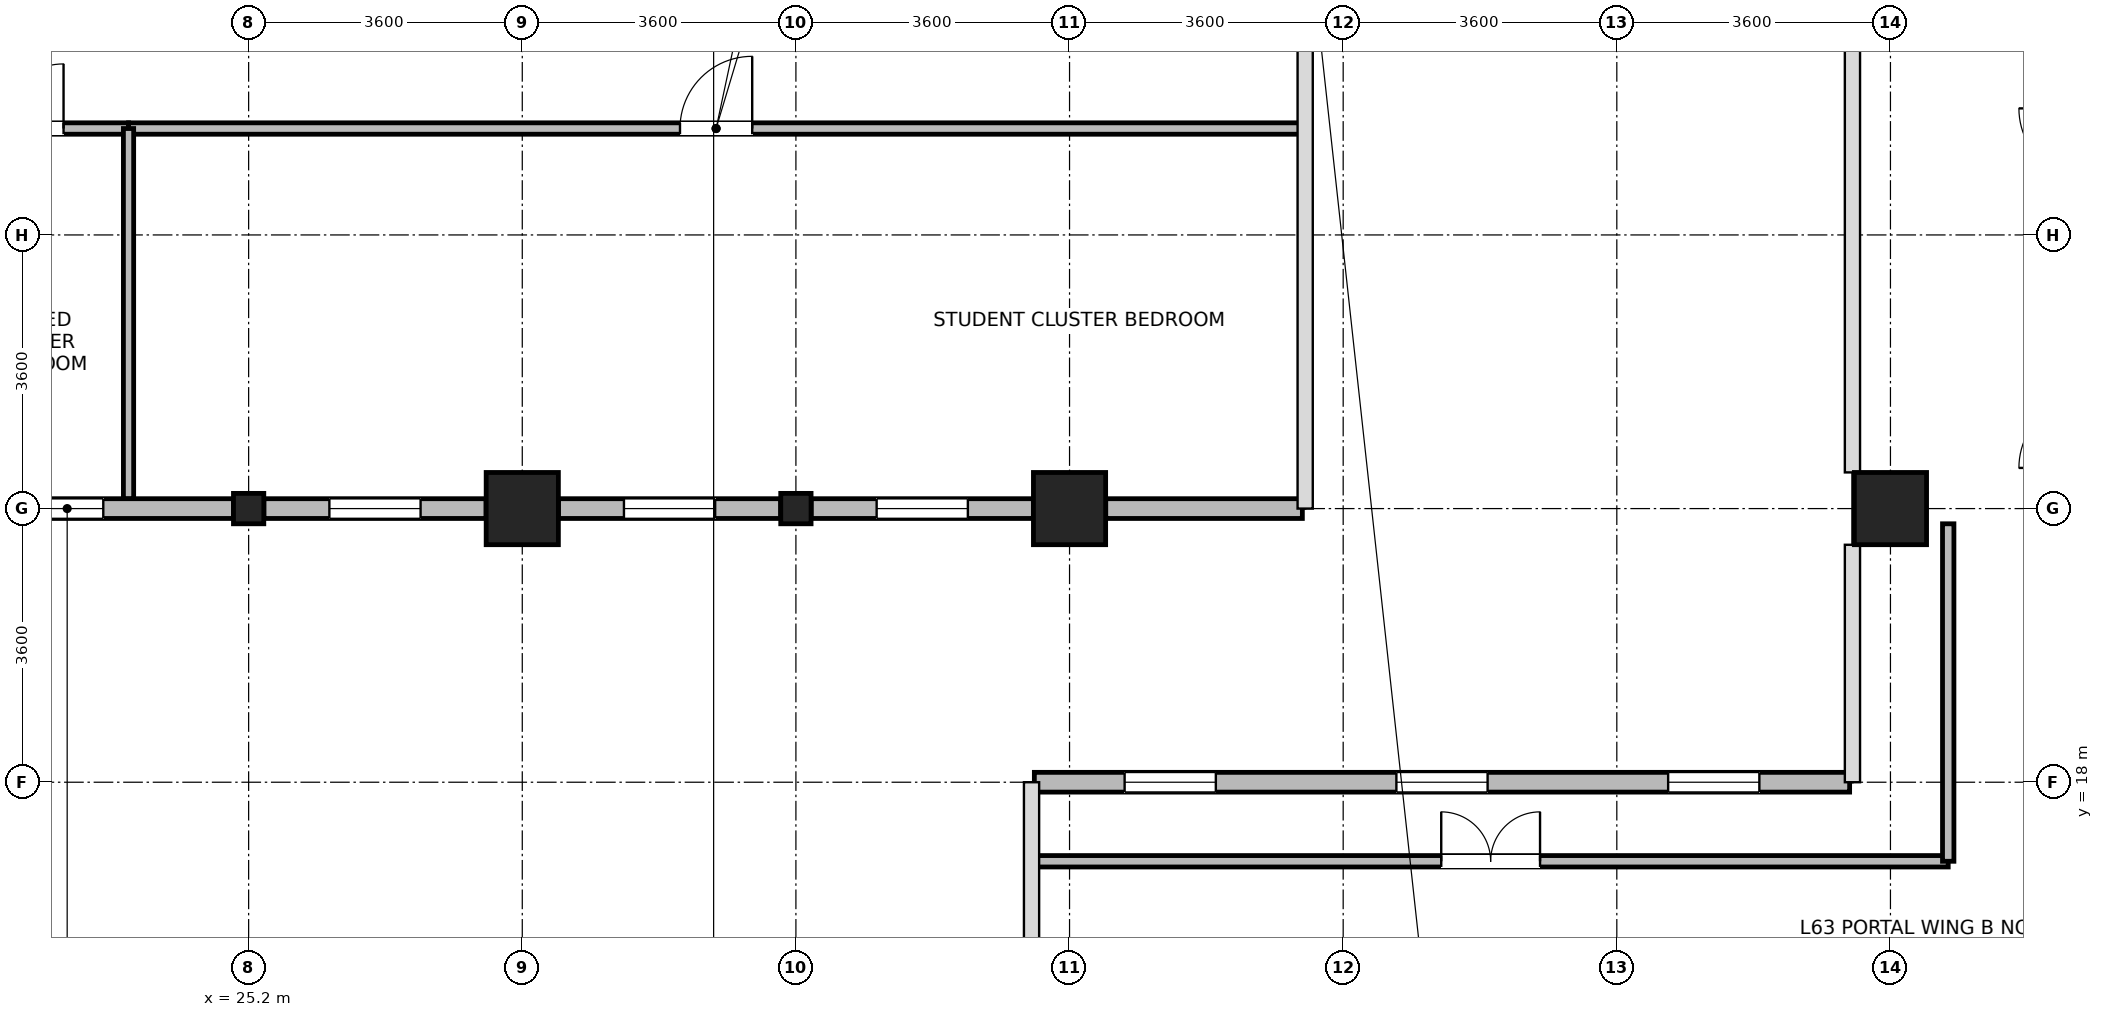
"""IFC4 building model, lengths in metres.
Left out: names, types, materials, properties, quantities, classifications, styles, units other than length and angle.
Written with IfcOpenShell. Run it as: python <this file> out.ifc"""

import sys

from ifc_helpers import new_model, si_unit, direction, frame, frame_2d, origin, origin_2d, place, context, subcontext, project, spatial, rectangle, i_section, extrude, source, transform, mapped, element, fill, save


model = new_model("IFC4")
c1 = context("Model", 3, precision=1e-05, world=origin(), true_north=direction((0.0, 1.0)))
c2 = subcontext(c1, "Body", "Model", "MODEL_VIEW")
j1 = project(units=[si_unit("LENGTHUNIT", "METRE"), si_unit("PLANEANGLEUNIT", "RADIAN")], contexts=[c1])
p1 = place(None, origin())
s1 = spatial("IfcSite", under=j1, at=p1, CompositionType="ELEMENT")
p2 = place(p1, origin())
s2 = spatial("IfcBuilding", under=s1, at=p2, CompositionType="ELEMENT")
p3 = place(p2, frame((0.0, 0.0, 246.2)))
s3 = spatial("IfcBuildingStorey", under=s2, at=p3, CompositionType="ELEMENT", Elevation=246.2)
m1 = source(origin(), c2, "Body", "SweptSolid", [
    extrude(rectangle(XDim=0.95, YDim=0.95, at=origin_2d()), origin(), (0.0, 0.0, 1.0), 3.7),
])
for number, where, z_axis, x_axis in (
    (1, (28.8, 21.6, 0.0), (0.0, 0.0, 1.0), (1.0, 0.0, 0.0)),
    (2, (36.0, 21.6, 0.0), (0.0, 0.0, 1.0), (1.0, 0.0, 0.0)),
    (3, (46.8, 21.6, 0.0), (0.0, 0.0, 1.0), (1.0, 0.0, 0.0)),
):
    element("IfcColumn", number, at=place(p3, frame(where, z_axis=z_axis, x_axis=x_axis)), inside=s3, PredefinedType="COLUMN", context=c2, shape_type="MappedRepresentation", body=[
        mapped(m1, transform((0.0, 0.0, 0.0), x_axis=(1.0, 0.0, 0.0), y_axis=(0.0, 1.0, 0.0), z_axis=(0.0, 0.0, 1.0), scale=1.0)),
    ])
m2 = source(origin(), c2, "Body", "SweptSolid", [
    extrude(i_section(OverallWidth=0.399, OverallDepth=0.4, WebThickness=0.017, FlangeThickness=0.023, FilletRadius=0.015, at=origin_2d()), origin(), (0.0, 0.0, 1.0), 3.7),
])
for number, where, z_axis, x_axis in (
    (4, (25.2, 21.6, 0.0), (0.0, 0.0, 1.0), (1.0, 0.0, 0.0)),
    (5, (32.4, 21.6, 0.0), (0.0, 0.0, 1.0), (1.0, 0.0, 0.0)),
):
    element("IfcColumn", number, at=place(p3, frame(where, z_axis=z_axis, x_axis=x_axis)), inside=s3, PredefinedType="COLUMN", context=c2, shape_type="MappedRepresentation", body=[
        mapped(m2, transform((0.0, 0.0, 0.0), x_axis=(1.0, 0.0, 0.0), y_axis=(0.0, 1.0, 0.0), z_axis=(0.0, 0.0, 1.0), scale=1.0)),
    ])
p4 = place(p3, frame((25.0, 21.6, 0.0), z_axis=(0.0, 0.0, 1.0), x_axis=(-1.0, 0.0, 0.0)))
e6 = element("IfcWall", 6, at=p4, inside=s3, PredefinedType="STANDARD", context=c2, shape_type="SweptSolid", body=[
    extrude(rectangle(XDim=2.924, YDim=0.26, at=frame_2d((1.462, 0.0))), origin(), (0.0, 0.0, 1.0), 2.86),
])
p5 = place(p4, frame((1.712, 0.0, 0.85)))
e7 = element("IfcOpeningElement", 7, at=p5, cuts=e6, PredefinedType="OPENING", context=c2, shape_type="SweptSolid", body=[
    extrude(rectangle(XDim=0.95, YDim=1.75, at=frame_2d((0.475, 0.875))), frame((0.0, 0.14, 0.0), z_axis=(0.0, -1.0, 0.0), x_axis=(1.0, 0.0, 0.0)), (0.0, 0.0, 1.0), 0.28),
])
p6 = place(p3, frame((28.324, 21.6, 0.0), z_axis=(0.0, 0.0, 1.0), x_axis=(-1.0, 0.0, 0.0)))
e8 = element("IfcWall", 8, at=p6, inside=s3, PredefinedType="STANDARD", context=c2, shape_type="SweptSolid", body=[
    extrude(rectangle(XDim=2.924, YDim=0.26, at=frame_2d((1.462, 0.0))), origin(), (0.0, 0.0, 1.0), 2.86),
])
p7 = place(p6, frame((0.862, 0.0, 0.85)))
e9 = element("IfcOpeningElement", 9, at=p7, cuts=e8, PredefinedType="OPENING", context=c2, shape_type="SweptSolid", body=[
    extrude(rectangle(XDim=1.2, YDim=1.75, at=frame_2d((0.6, 0.875))), frame((0.0, 0.14, 0.0), z_axis=(0.0, -1.0, 0.0), x_axis=(1.0, 0.0, 0.0)), (0.0, 0.0, 1.0), 0.28),
])
p8 = place(p3, frame((32.199, 21.6, 0.0), z_axis=(0.0, 0.0, 1.0), x_axis=(-1.0, 0.0, 0.0)))
e10 = element("IfcWall", 10, at=p8, inside=s3, PredefinedType="STANDARD", context=c2, shape_type="SweptSolid", body=[
    extrude(rectangle(XDim=2.924, YDim=0.26, at=frame_2d((1.462, 0.0))), origin(), (0.0, 0.0, 1.0), 2.86),
])
p9 = place(p8, frame((0.862, 0.0, 0.85)))
e11 = element("IfcOpeningElement", 11, at=p9, cuts=e10, PredefinedType="OPENING", context=c2, shape_type="SweptSolid", body=[
    extrude(rectangle(XDim=1.2, YDim=1.75, at=frame_2d((0.6, 0.875))), frame((0.0, 0.14, 0.0), z_axis=(0.0, -1.0, 0.0), x_axis=(1.0, 0.0, 0.0)), (0.0, 0.0, 1.0), 0.28),
])
p10 = place(p3, frame((35.524, 21.6, 0.0), z_axis=(0.0, 0.0, 1.0), x_axis=(-1.0, 0.0, 0.0)))
e12 = element("IfcWall", 12, at=p10, inside=s3, PredefinedType="STANDARD", context=c2, shape_type="SweptSolid", body=[
    extrude(rectangle(XDim=2.923, YDim=0.26, at=frame_2d((1.462, 0.0))), origin(), (0.0, 0.0, 1.0), 2.86),
])
p11 = place(p10, frame((0.862, 0.0, 0.85)))
e13 = element("IfcOpeningElement", 13, at=p11, cuts=e12, PredefinedType="OPENING", context=c2, shape_type="SweptSolid", body=[
    extrude(rectangle(XDim=1.2, YDim=1.75, at=frame_2d((0.6, 0.875))), frame((0.0, 0.14, 0.0), z_axis=(0.0, -1.0, 0.0), x_axis=(1.0, 0.0, 0.0)), (0.0, 0.0, 1.0), 0.28),
])
p12 = place(p3, frame((39.063, 21.6, 0.0), z_axis=(0.0, 0.0, 1.0), x_axis=(-1.0, 0.0, 0.0)))
e14 = element("IfcWall", 14, at=p12, inside=s3, PredefinedType="STANDARD", context=c2, shape_type="SweptSolid", body=[
    extrude(rectangle(XDim=2.587, YDim=0.26, at=frame_2d((1.293, 0.0))), origin(), (0.0, 0.0, 1.0), 1.46),
])
p13 = place(p3, frame((35.537, 18.0, 0.0), z_axis=(0.0, 0.0, 1.0), x_axis=(1.0, 0.0, 0.0)))
e15 = element("IfcWall", 15, at=p13, inside=s3, PredefinedType="STANDARD", context=c2, shape_type="SweptSolid", body=[
    extrude(rectangle(XDim=10.726, YDim=0.26, at=frame_2d((5.363, 0.0))), origin(), (0.0, 0.0, 1.0), 3.26),
])
p14 = place(p13, frame((1.188, 0.0, 0.85)))
e16 = element("IfcOpeningElement", 16, at=p14, cuts=e15, PredefinedType="OPENING", context=c2, shape_type="SweptSolid", body=[
    extrude(rectangle(XDim=1.2, YDim=1.75, at=frame_2d((0.6, 0.875))), frame((0.0, 0.14, 0.0), z_axis=(0.0, -1.0, 0.0), x_axis=(1.0, 0.0, 0.0)), (0.0, 0.0, 1.0), 0.28),
])
p15 = place(p13, frame((4.763, 0.0, 0.85)))
e17 = element("IfcOpeningElement", 17, at=p15, cuts=e15, PredefinedType="OPENING", context=c2, shape_type="SweptSolid", body=[
    extrude(rectangle(XDim=1.2, YDim=1.75, at=frame_2d((0.6, 0.875))), frame((0.0, 0.14, 0.0), z_axis=(0.0, -1.0, 0.0), x_axis=(1.0, 0.0, 0.0)), (0.0, 0.0, 1.0), 0.28),
])
p16 = place(p13, frame((8.338, 0.0, 0.85)))
e18 = element("IfcOpeningElement", 18, at=p16, cuts=e15, PredefinedType="OPENING", context=c2, shape_type="SweptSolid", body=[
    extrude(rectangle(XDim=1.2, YDim=1.75, at=frame_2d((0.6, 0.875))), frame((0.0, 0.14, 0.0), z_axis=(0.0, -1.0, 0.0), x_axis=(1.0, 0.0, 0.0)), (0.0, 0.0, 1.0), 0.28),
])
p17 = place(p3, frame((23.62, 26.6, 0.0), z_axis=(0.0, 0.0, 1.0), x_axis=(1.0, 0.0, 0.0)))
e19 = element("IfcWall", 19, at=p17, inside=s3, PredefinedType="PARTITIONING", context=c2, shape_type="SweptSolid", body=[
    extrude(rectangle(XDim=15.46, YDim=0.15, at=frame_2d((7.73, 0.0))), origin(), (0.0, 0.0, 1.0), 3.26),
])
p18 = place(p17, frame((7.255, 0.0, 0.0)))
e20 = element("IfcOpeningElement", 20, at=p18, cuts=e19, PredefinedType="OPENING", context=c2, shape_type="SweptSolid", body=[
    extrude(rectangle(XDim=0.95, YDim=2.1, at=frame_2d((0.475, 1.05))), frame((0.0, 0.085, 0.0), z_axis=(0.0, -1.0, 0.0), x_axis=(1.0, 0.0, 0.0)), (0.0, 0.0, 1.0), 0.17),
])
p19 = place(p3, frame((35.52, 16.96, 0.0), z_axis=(0.0, 0.0, 1.0), x_axis=(1.0, 0.0, 0.0)))
e21 = element("IfcWall", 21, at=p19, inside=s3, PredefinedType="PARTITIONING", context=c2, shape_type="SweptSolid", body=[
    extrude(rectangle(XDim=12.04, YDim=0.15, at=frame_2d((6.02, 0.0))), origin(), (0.0, 0.0, 1.0), 3.26),
])
p20 = place(p19, frame((5.37, 0.0, 0.0)))
e22 = element("IfcOpeningElement", 22, at=p20, cuts=e21, PredefinedType="OPENING", context=c2, shape_type="SweptSolid", body=[
    extrude(rectangle(XDim=1.3, YDim=2.12, at=frame_2d((0.65, 1.06))), frame((0.0, 0.085, 0.0), z_axis=(0.0, -1.0, 0.0), x_axis=(1.0, 0.0, 0.0)), (0.0, 0.0, 1.0), 0.17),
])
p21 = place(p3, frame((47.56, 16.96, 0.0), z_axis=(0.0, 0.0, 1.0), x_axis=(0.0, 1.0, 0.0)))
e23 = element("IfcWall", 23, at=p21, inside=s3, PredefinedType="PARTITIONING", context=c2, shape_type="SweptSolid", body=[
    extrude(rectangle(XDim=4.44, YDim=0.15, at=frame_2d((2.22, 0.0))), origin(), (0.0, 0.0, 1.0), 3.26),
])
p22 = place(p3, frame((21.06, 26.6, 0.0), z_axis=(0.0, 0.0, 1.0), x_axis=(1.0, 0.0, 0.0)))
e24 = element("IfcWall", 24, at=p22, inside=s3, PredefinedType="PARTITIONING", context=c2, shape_type="SweptSolid", body=[
    extrude(rectangle(XDim=2.56, YDim=0.15, at=frame_2d((1.28, 0.0))), origin(), (0.0, 0.0, 1.0), 3.26),
])
p23 = place(p22, frame((0.855, 0.0, 0.0)))
e25 = element("IfcOpeningElement", 25, at=p23, cuts=e24, PredefinedType="OPENING", context=c2, shape_type="SweptSolid", body=[
    extrude(rectangle(XDim=0.85, YDim=2.04, at=frame_2d((0.425, 1.02))), frame((0.0, 0.085, 0.0), z_axis=(0.0, -1.0, 0.0), x_axis=(1.0, 0.0, 0.0)), (0.0, 0.0, 1.0), 0.17),
])
p24 = place(p3, frame((23.62, 21.732, 0.0), z_axis=(0.0, 0.0, 1.0), x_axis=(0.0, 1.0, 0.0)))
e26 = element("IfcWall", 26, at=p24, inside=s3, PredefinedType="PARTITIONING", context=c2, shape_type="SweptSolid", body=[
    extrude(rectangle(XDim=4.868, YDim=0.135, at=frame_2d((2.434, 0.0))), origin(), (0.0, 0.0, 1.0), 3.26),
])
p25 = place(p5, origin())
e27 = element("IfcWindow", 27, at=p25, inside=s3, PartitioningType="SINGLE_PANEL", PredefinedType="WINDOW", context=c2, shape_type="SweptSolid", body=[
    extrude(rectangle(XDim=0.95, YDim=1.75, at=frame_2d((0.475, 0.875))), frame((0.0, 0.03, 0.0), z_axis=(0.0, -1.0, 0.0), x_axis=(1.0, 0.0, 0.0)), (0.0, 0.0, 1.0), 0.06),
])
fill(e7, e27)
p26 = place(p7, origin())
e28 = element("IfcWindow", 28, at=p26, inside=s3, PartitioningType="SINGLE_PANEL", PredefinedType="WINDOW", context=c2, shape_type="SweptSolid", body=[
    extrude(rectangle(XDim=1.2, YDim=1.75, at=frame_2d((0.6, 0.875))), frame((0.0, 0.03, 0.0), z_axis=(0.0, -1.0, 0.0), x_axis=(1.0, 0.0, 0.0)), (0.0, 0.0, 1.0), 0.06),
])
fill(e9, e28)
p27 = place(p9, origin())
e29 = element("IfcWindow", 29, at=p27, inside=s3, PartitioningType="SINGLE_PANEL", PredefinedType="WINDOW", context=c2, shape_type="SweptSolid", body=[
    extrude(rectangle(XDim=1.2, YDim=1.75, at=frame_2d((0.6, 0.875))), frame((0.0, 0.03, 0.0), z_axis=(0.0, -1.0, 0.0), x_axis=(1.0, 0.0, 0.0)), (0.0, 0.0, 1.0), 0.06),
])
fill(e11, e29)
p28 = place(p11, origin())
e30 = element("IfcWindow", 30, at=p28, inside=s3, PartitioningType="SINGLE_PANEL", PredefinedType="WINDOW", context=c2, shape_type="SweptSolid", body=[
    extrude(rectangle(XDim=1.2, YDim=1.75, at=frame_2d((0.6, 0.875))), frame((0.0, 0.03, 0.0), z_axis=(0.0, -1.0, 0.0), x_axis=(1.0, 0.0, 0.0)), (0.0, 0.0, 1.0), 0.06),
])
fill(e13, e30)
p29 = place(p14, origin())
e31 = element("IfcWindow", 31, at=p29, inside=s3, PartitioningType="SINGLE_PANEL", PredefinedType="WINDOW", context=c2, shape_type="SweptSolid", body=[
    extrude(rectangle(XDim=1.2, YDim=1.75, at=frame_2d((0.6, 0.875))), frame((0.0, 0.03, 0.0), z_axis=(0.0, -1.0, 0.0), x_axis=(1.0, 0.0, 0.0)), (0.0, 0.0, 1.0), 0.06),
])
fill(e16, e31)
p30 = place(p15, origin())
e32 = element("IfcWindow", 32, at=p30, inside=s3, PartitioningType="SINGLE_PANEL", PredefinedType="WINDOW", context=c2, shape_type="SweptSolid", body=[
    extrude(rectangle(XDim=1.2, YDim=1.75, at=frame_2d((0.6, 0.875))), frame((0.0, 0.03, 0.0), z_axis=(0.0, -1.0, 0.0), x_axis=(1.0, 0.0, 0.0)), (0.0, 0.0, 1.0), 0.06),
])
fill(e17, e32)
p31 = place(p16, origin())
e33 = element("IfcWindow", 33, at=p31, inside=s3, PartitioningType="SINGLE_PANEL", PredefinedType="WINDOW", context=c2, shape_type="SweptSolid", body=[
    extrude(rectangle(XDim=1.2, YDim=1.75, at=frame_2d((0.6, 0.875))), frame((0.0, 0.03, 0.0), z_axis=(0.0, -1.0, 0.0), x_axis=(1.0, 0.0, 0.0)), (0.0, 0.0, 1.0), 0.06),
])
fill(e18, e33)
p32 = place(p18, origin())
e34 = element("IfcDoor", 34, at=p32, inside=s3, OperationType="SINGLE_SWING_RIGHT", PredefinedType="DOOR", context=c2, shape_type="SweptSolid", body=[
    extrude(rectangle(XDim=0.95, YDim=2.1, at=frame_2d((0.475, 1.05))), frame((0.0, 0.025, 0.0), z_axis=(0.0, -1.0, 0.0), x_axis=(1.0, 0.0, 0.0)), (0.0, 0.0, 1.0), 0.05),
])
fill(e20, e34)
p33 = place(p20, origin())
e35 = element("IfcDoor", 35, at=p33, inside=s3, OperationType="DOUBLE_DOOR_SINGLE_SWING", PredefinedType="DOOR", context=c2, shape_type="SweptSolid", body=[
    extrude(rectangle(XDim=1.3, YDim=2.12, at=frame_2d((0.65, 1.06))), frame((0.0, 0.025, 0.0), z_axis=(0.0, -1.0, 0.0), x_axis=(1.0, 0.0, 0.0)), (0.0, 0.0, 1.0), 0.05),
])
fill(e22, e35)
p34 = place(p23, origin())
e36 = element("IfcDoor", 36, at=p34, inside=s3, OperationType="SINGLE_SWING_RIGHT", PredefinedType="DOOR", context=c2, shape_type="SweptSolid", body=[
    extrude(rectangle(XDim=0.85, YDim=2.04, at=frame_2d((0.425, 1.02))), frame((0.0, 0.025, 0.0), z_axis=(0.0, -1.0, 0.0), x_axis=(1.0, 0.0, 0.0)), (0.0, 0.0, 1.0), 0.05),
])
fill(e25, e36)
save(model, sys.argv[1])
